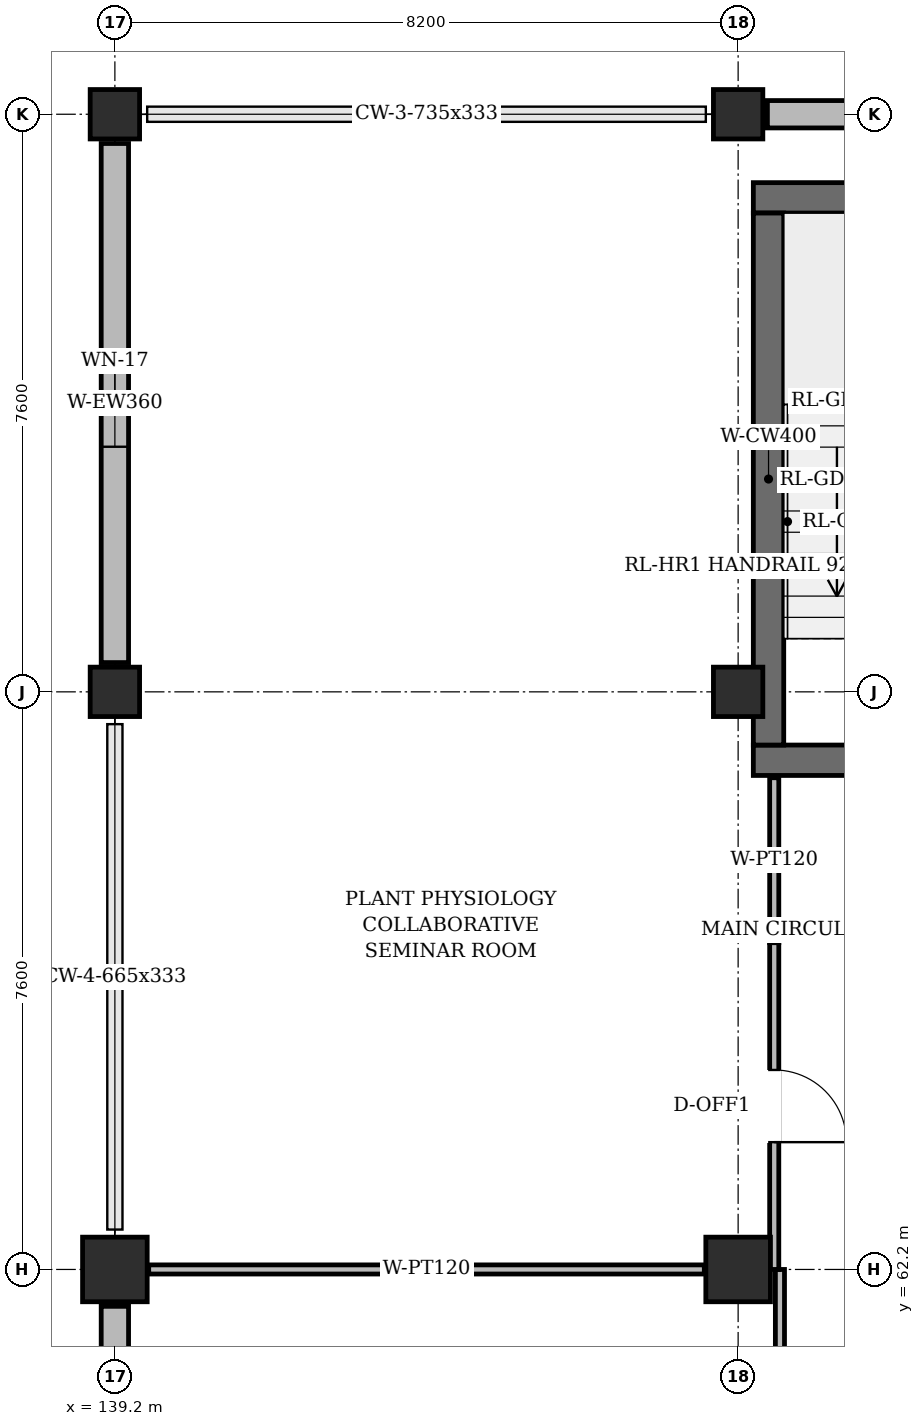
"""IFC4 building model, lengths in metres.
Left out: names, types, materials, properties, quantities, classifications, styles, units other than length and angle.
Written with IfcOpenShell. Run it as: python <this file> out.ifc"""

import sys

from ifc_helpers import new_model, si_unit, direction, frame, frame_2d, origin, origin_2d, place, context, subcontext, project, spatial, rectangle, extrude, element, fill, save


model = new_model("IFC4")
c1 = context("Model", 3, precision=1e-05, world=origin(), true_north=direction((0.0, 1.0)))
c2 = subcontext(c1, "Body", "Model", "MODEL_VIEW")
j1 = project(units=[si_unit("LENGTHUNIT", "METRE"), si_unit("PLANEANGLEUNIT", "RADIAN")], contexts=[c1])
p1 = place(None, origin())
s1 = spatial("IfcSite", under=j1, at=p1, CompositionType="ELEMENT")
p2 = place(p1, origin())
s2 = spatial("IfcBuilding", under=s1, at=p2, CompositionType="ELEMENT")
p3 = place(p2, frame((0.0, 0.0, 24.0)))
s3 = spatial("IfcBuildingStorey", under=s2, at=p3, CompositionType="ELEMENT", Elevation=24.0)
p4 = place(p3, frame((139.2, 62.2, 0.0), z_axis=(0.0, 0.0, 1.0), x_axis=(1.0, 0.0, 0.0)))
e1 = element("IfcColumn", 1, at=p4, inside=s3, PredefinedType="COLUMN", context=c2, shape_type="SweptSolid", body=[
    extrude(rectangle(XDim=0.85, YDim=0.85, at=origin_2d()), origin(), (0.0, 0.0, 1.0), 3.93),
])
for number, where, z_axis, x_axis in (
    (2, (139.2, 69.8, 0.0), (0.0, 0.0, 1.0), (1.0, 0.0, 0.0)),
    (3, (139.2, 77.4, 0.0), (0.0, 0.0, 1.0), (1.0, 0.0, 0.0)),
):
    element("IfcColumn", number, at=place(p3, frame(where, z_axis=z_axis, x_axis=x_axis)), inside=s3, PredefinedType="COLUMN", context=c2, shape_type="SweptSolid", body=[
        extrude(rectangle(XDim=0.65, YDim=0.65, at=origin_2d()), origin(), (0.0, 0.0, 1.0), 3.93),
    ])
p5 = place(p3, frame((147.4, 62.2, 0.0), z_axis=(0.0, 0.0, 1.0), x_axis=(1.0, 0.0, 0.0)))
e4 = element("IfcColumn", 4, at=p5, inside=s3, PredefinedType="COLUMN", context=c2, shape_type="SweptSolid", body=[
    extrude(rectangle(XDim=0.85, YDim=0.85, at=origin_2d()), origin(), (0.0, 0.0, 1.0), 3.93),
])
for number, where, z_axis, x_axis in (
    (5, (147.4, 69.8, 0.0), (0.0, 0.0, 1.0), (1.0, 0.0, 0.0)),
    (6, (147.4, 77.4, 0.0), (0.0, 0.0, 1.0), (1.0, 0.0, 0.0)),
):
    element("IfcColumn", number, at=place(p3, frame(where, z_axis=z_axis, x_axis=x_axis)), inside=s3, PredefinedType="COLUMN", context=c2, shape_type="SweptSolid", body=[
        extrude(rectangle(XDim=0.65, YDim=0.65, at=origin_2d()), origin(), (0.0, 0.0, 1.0), 3.93),
    ])
p6 = place(p3, frame((155.215, 77.4, 0.0), z_axis=(0.0, 0.0, 1.0), x_axis=(-1.0, 0.0, 0.0)))
e7 = element("IfcWall", 7, at=p6, inside=s3, PredefinedType="SOLIDWALL", context=c2, shape_type="SweptSolid", body=[
    extrude(rectangle(XDim=7.43, YDim=0.36, at=frame_2d((3.715, 0.0))), origin(), (0.0, 0.0, 1.0), 3.315),
])
p7 = place(p6, frame((2.69, 0.0, 0.95)))
e8 = element("IfcOpeningElement", 8, at=p7, cuts=e7, PredefinedType="OPENING", context=c2, shape_type="SweptSolid", body=[
    extrude(rectangle(XDim=2.05, YDim=1.75, at=frame_2d((1.025, 0.875))), frame((0.0, 0.192, 0.0), z_axis=(0.0, -1.0, 0.0), x_axis=(1.0, 0.0, 0.0)), (0.0, 0.0, 1.0), 0.384),
])
p8 = place(p3, frame((139.2, 77.015, 0.0), z_axis=(0.0, 0.0, 1.0), x_axis=(0.0, -1.0, 0.0)))
e9 = element("IfcWall", 9, at=p8, inside=s3, PredefinedType="SOLIDWALL", context=c2, shape_type="SweptSolid", body=[
    extrude(rectangle(XDim=6.83, YDim=0.36, at=frame_2d((3.415, 0.0))), origin(), (0.0, 0.0, 1.0), 3.315),
])
p9 = place(p8, frame((2.84, 0.0, 0.95)))
e10 = element("IfcOpeningElement", 10, at=p9, cuts=e9, PredefinedType="OPENING", context=c2, shape_type="SweptSolid", body=[
    extrude(rectangle(XDim=1.15, YDim=1.25, at=frame_2d((0.575, 0.625))), frame((0.0, 0.192, 0.0), z_axis=(0.0, -1.0, 0.0), x_axis=(1.0, 0.0, 0.0)), (0.0, 0.0, 1.0), 0.384),
])
p10 = place(p3, frame((139.2, 61.715, 0.0), z_axis=(0.0, 0.0, 1.0), x_axis=(0.0, -1.0, 0.0)))
e11 = element("IfcWall", 11, at=p10, inside=s3, PredefinedType="SOLIDWALL", context=c2, shape_type="SweptSolid", body=[
    extrude(rectangle(XDim=6.63, YDim=0.36, at=frame_2d((3.315, 0.0))), origin(), (0.0, 0.0, 1.0), 3.315),
])
p11 = place(p10, frame((2.64, 0.0, 0.95)))
e12 = element("IfcOpeningElement", 12, at=p11, cuts=e11, PredefinedType="OPENING", context=c2, shape_type="SweptSolid", body=[
    extrude(rectangle(XDim=1.35, YDim=1.75, at=frame_2d((0.675, 0.875))), frame((0.0, 0.192, 0.0), z_axis=(0.0, -1.0, 0.0), x_axis=(1.0, 0.0, 0.0)), (0.0, 0.0, 1.0), 0.384),
])
p12 = place(p3, frame((147.6, 68.9, 0.0), z_axis=(0.0, 0.0, 1.0), x_axis=(1.0, 0.0, 0.0)))
e13 = element("IfcWall", 13, at=p12, inside=s3, PredefinedType="SHEAR", context=c2, shape_type="SweptSolid", body=[
    extrude(rectangle(XDim=3.8, YDim=0.4, at=frame_2d((1.9, 0.0))), origin(), (0.0, 0.0, 1.0), 3.93),
])
p13 = place(p12, frame((1.3, 0.0, 0.0)))
e14 = element("IfcOpeningElement", 14, at=p13, cuts=e13, PredefinedType="OPENING", context=c2, shape_type="SweptSolid", body=[
    extrude(rectangle(XDim=1.2, YDim=2.2, at=frame_2d((0.6, 1.1))), frame((0.0, 0.212, 0.0), z_axis=(0.0, -1.0, 0.0), x_axis=(1.0, 0.0, 0.0)), (0.0, 0.0, 1.0), 0.424),
])
p14 = place(p3, frame((147.6, 76.3, 0.0), z_axis=(0.0, 0.0, 1.0), x_axis=(1.0, 0.0, 0.0)))
e15 = element("IfcWall", 15, at=p14, inside=s3, PredefinedType="SHEAR", context=c2, shape_type="SweptSolid", body=[
    extrude(rectangle(XDim=3.8, YDim=0.4, at=frame_2d((1.9, 0.0))), origin(), (0.0, 0.0, 1.0), 3.93),
])
p15 = place(p3, frame((147.8, 69.1, 0.0), z_axis=(0.0, 0.0, 1.0), x_axis=(0.0, 1.0, 0.0)))
e16 = element("IfcWall", 16, at=p15, inside=s3, PredefinedType="SHEAR", context=c2, shape_type="SweptSolid", body=[
    extrude(rectangle(XDim=7.0, YDim=0.4, at=frame_2d((3.5, 0.0))), origin(), (0.0, 0.0, 1.0), 3.93),
])
p16 = place(p3, frame((147.95, 46.51, 0.0), z_axis=(0.0, 0.0, 1.0), x_axis=(0.0, 1.0, 0.0)))
e17 = element("IfcWall", 17, at=p16, inside=s3, PredefinedType="PARTITIONING", context=c2, shape_type="SweptSolid", body=[
    extrude(rectangle(XDim=15.69, YDim=0.12, at=frame_2d((7.845, 0.0))), origin(), (0.0, 0.0, 1.0), 3.805),
])
p17 = place(p16, frame((6.443, 0.0, 0.0)))
e18 = element("IfcOpeningElement", 18, at=p17, cuts=e17, PredefinedType="OPENING", context=c2, shape_type="SweptSolid", body=[
    extrude(rectangle(XDim=1.05, YDim=2.2, at=frame_2d((0.525, 1.1))), frame((0.0, 0.072, 0.0), z_axis=(0.0, -1.0, 0.0), x_axis=(1.0, 0.0, 0.0)), (0.0, 0.0, 1.0), 0.144),
])
p18 = place(p3, frame((147.875, 62.2, 0.0), z_axis=(0.0, 0.0, 1.0), x_axis=(0.0, 1.0, 0.0)))
e19 = element("IfcWall", 19, at=p18, inside=s3, PredefinedType="PARTITIONING", context=c2, shape_type="SweptSolid", body=[
    extrude(rectangle(XDim=4.3, YDim=0.12, at=frame_2d((2.15, 0.0))), origin(), (0.0, 0.0, 1.0), 3.805),
])
p19 = place(p18, frame((1.675, 0.0, 0.0)))
e20 = element("IfcOpeningElement", 20, at=p19, cuts=e19, PredefinedType="OPENING", context=c2, shape_type="SweptSolid", body=[
    extrude(rectangle(XDim=0.95, YDim=2.2, at=frame_2d((0.475, 1.1))), frame((0.0, 0.072, 0.0), z_axis=(0.0, -1.0, 0.0), x_axis=(1.0, 0.0, 0.0)), (0.0, 0.0, 1.0), 0.144),
])
p20 = place(p3, frame((147.875, 66.5, 0.0), z_axis=(0.0, 0.0, 1.0), x_axis=(0.0, 1.0, 0.0)))
e21 = element("IfcWall", 21, at=p20, inside=s3, PredefinedType="PARTITIONING", context=c2, shape_type="SweptSolid", body=[
    extrude(rectangle(XDim=2.17, YDim=0.12, at=frame_2d((1.085, 0.0))), origin(), (0.0, 0.0, 1.0), 3.805),
])
p21 = place(p3, frame((139.645, 62.2, 0.0), z_axis=(0.0, 0.0, 1.0), x_axis=(1.0, 0.0, 0.0)))
e22 = element("IfcWall", 22, at=p21, inside=s3, PredefinedType="PARTITIONING", context=c2, shape_type="SweptSolid", body=[
    extrude(rectangle(XDim=7.31, YDim=0.12, at=frame_2d((3.655, 0.0))), origin(), (0.0, 0.0, 1.0), 3.265),
])
p22 = place(p9, origin())
e23 = element("IfcWindow", 23, at=p22, inside=s3, PartitioningType="SINGLE_PANEL", PredefinedType="WINDOW", context=c2, shape_type="SweptSolid", body=[
    extrude(rectangle(XDim=1.15, YDim=1.25, at=frame_2d((0.575, 0.625))), frame((0.0, 0.03, 0.0), z_axis=(0.0, -1.0, 0.0), x_axis=(1.0, 0.0, 0.0)), (0.0, 0.0, 1.0), 0.06),
])
fill(e10, e23)
p23 = place(p19, frame((0.95, 0.0, 0.0), z_axis=(0.0, 0.0, 1.0), x_axis=(-1.0, 0.0, 0.0)))
e24 = element("IfcDoor", 24, at=p23, inside=s3, OperationType="SINGLE_SWING_RIGHT", PredefinedType="DOOR", context=c2, shape_type="SweptSolid", body=[
    extrude(rectangle(XDim=0.95, YDim=2.2, at=frame_2d((0.475, 1.1))), frame((0.0, 0.025, 0.0), z_axis=(0.0, -1.0, 0.0), x_axis=(1.0, 0.0, 0.0)), (0.0, 0.0, 1.0), 0.05),
])
fill(e20, e24)
save(model, sys.argv[1])
